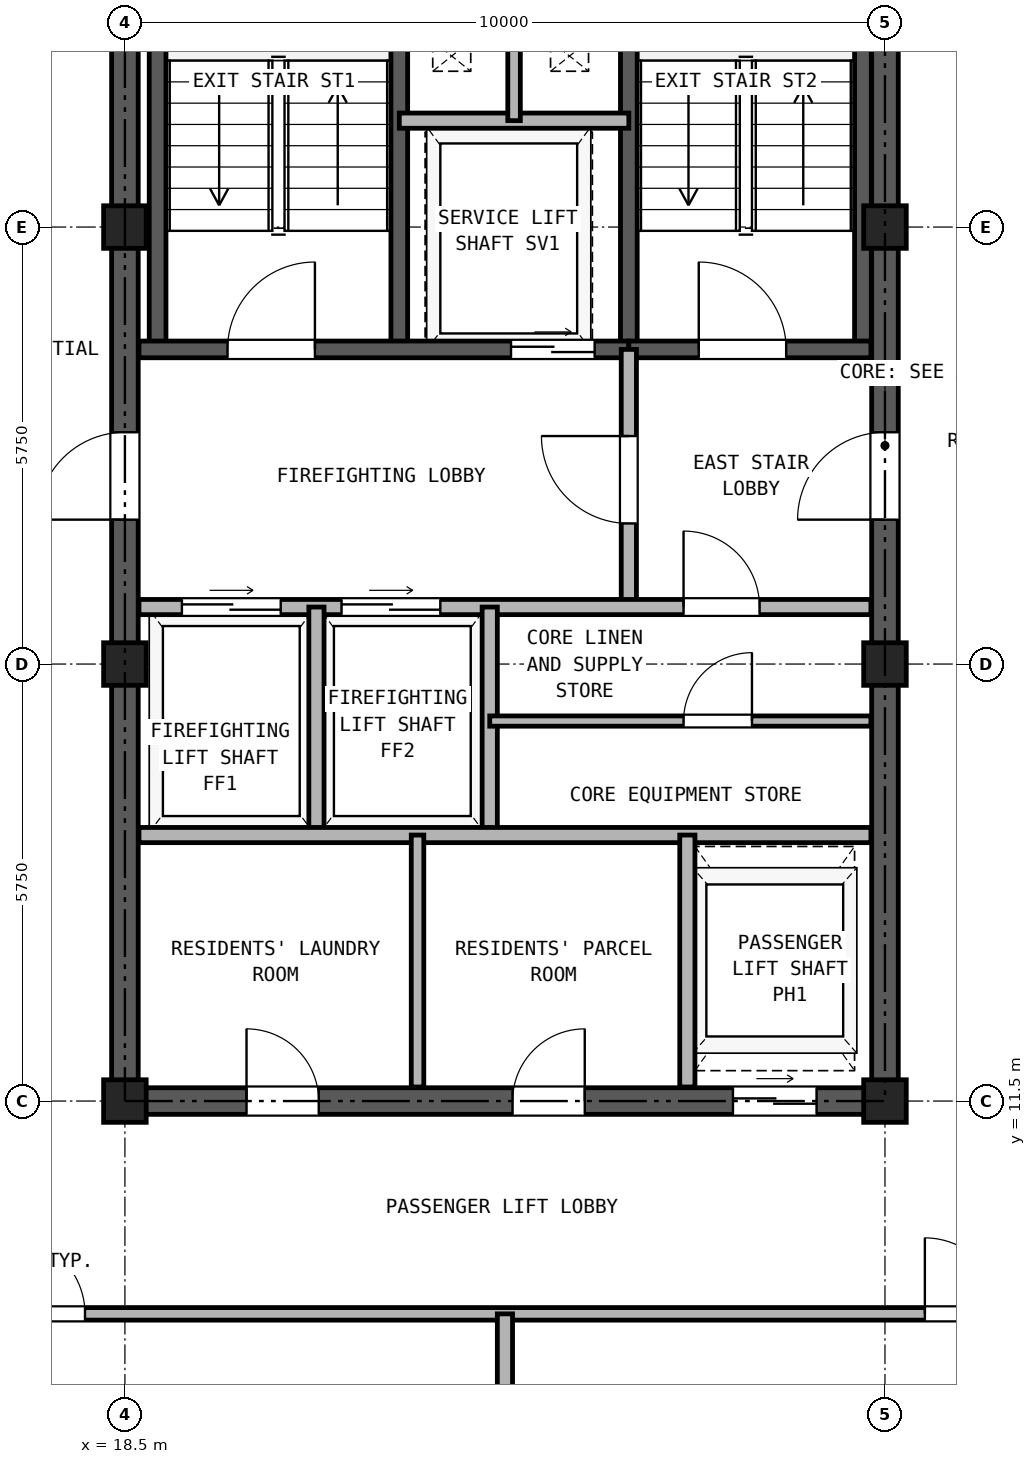
"""IFC4 building model, lengths in metres.
Left out: names, types, materials, properties, quantities, classifications, styles, units other than length and angle.
Written with IfcOpenShell. Run it as: python <this file> out.ifc"""

import sys

from ifc_helpers import new_model, si_unit, direction, frame, frame_2d, origin, origin_2d, place, context, subcontext, project, spatial, rectangle, hollow_rectangle, extrude, source, transform, mapped, element, fill, save


model = new_model("IFC4")
c1 = context("Model", 3, precision=1e-05, world=origin(), true_north=direction((0.0, 1.0)))
c2 = subcontext(c1, "Body", "Model", "MODEL_VIEW")
j1 = project(units=[si_unit("LENGTHUNIT", "METRE"), si_unit("PLANEANGLEUNIT", "RADIAN")], contexts=[c1])
p1 = place(None, origin())
s1 = spatial("IfcSite", under=j1, at=p1, CompositionType="ELEMENT")
p2 = place(p1, origin())
s2 = spatial("IfcBuilding", under=s1, at=p2, CompositionType="ELEMENT")
p3 = place(p2, frame((0.0, 0.0, 242.5)))
s3 = spatial("IfcBuildingStorey", under=s2, at=p3, CompositionType="ELEMENT", Elevation=242.5)
m1 = source(origin(), c2, "Body", "SweptSolid", [
    extrude(hollow_rectangle(XDim=0.56, YDim=0.56, WallThickness=0.03, at=origin_2d()), origin(), (0.0, 0.0, 1.0), 2.98),
])
for number, where, z_axis, x_axis in (
    (1, (18.5, 11.5, 0.0), (0.0, 0.0, 1.0), (1.0, 0.0, 0.0)),
    (2, (18.5, 17.25, 0.0), (0.0, 0.0, 1.0), (1.0, 0.0, 0.0)),
    (3, (18.5, 23.0, 0.0), (0.0, 0.0, 1.0), (1.0, 0.0, 0.0)),
    (4, (28.5, 11.5, 0.0), (0.0, 0.0, 1.0), (1.0, 0.0, 0.0)),
    (5, (28.5, 17.25, 0.0), (0.0, 0.0, 1.0), (1.0, 0.0, 0.0)),
    (6, (28.5, 23.0, 0.0), (0.0, 0.0, 1.0), (1.0, 0.0, 0.0)),
):
    element("IfcColumn", number, at=place(p3, frame(where, z_axis=z_axis, x_axis=x_axis)), inside=s3, PredefinedType="COLUMN", context=c2, shape_type="MappedRepresentation", body=[
        mapped(m1, transform((0.0, 0.0, 0.0), x_axis=(1.0, 0.0, 0.0), y_axis=(0.0, 1.0, 0.0), z_axis=(0.0, 0.0, 1.0), scale=1.0)),
    ])
p4 = place(p3, frame((18.325, 11.5, 0.0), z_axis=(0.0, 0.0, 1.0), x_axis=(1.0, 0.0, 0.0)))
e7 = element("IfcWall", 7, at=p4, inside=s3, PredefinedType="SHEAR", context=c2, shape_type="SweptSolid", body=[
    extrude(rectangle(XDim=10.35, YDim=0.35, at=frame_2d((5.175, 0.0))), origin(), (0.0, 0.0, 1.0), 2.98),
])
p5 = place(p4, frame((1.775, 0.0, 0.0)))
e8 = element("IfcOpeningElement", 8, at=p5, cuts=e7, PredefinedType="OPENING", context=c2, shape_type="SweptSolid", body=[
    extrude(rectangle(XDim=0.95, YDim=2.15, at=frame_2d((0.475, 1.075))), frame((0.0, 0.185, 0.0), z_axis=(0.0, -1.0, 0.0), x_axis=(1.0, 0.0, 0.0)), (0.0, 0.0, 1.0), 0.37),
])
p6 = place(p4, frame((5.275, 0.0, 0.0)))
e9 = element("IfcOpeningElement", 9, at=p6, cuts=e7, PredefinedType="OPENING", context=c2, shape_type="SweptSolid", body=[
    extrude(rectangle(XDim=0.95, YDim=2.15, at=frame_2d((0.475, 1.075))), frame((0.0, 0.185, 0.0), z_axis=(0.0, -1.0, 0.0), x_axis=(1.0, 0.0, 0.0)), (0.0, 0.0, 1.0), 0.37),
])
p7 = place(p4, frame((8.175, 0.0, 0.0)))
e10 = element("IfcOpeningElement", 10, at=p7, cuts=e7, PredefinedType="OPENING", context=c2, shape_type="SweptSolid", body=[
    extrude(rectangle(XDim=1.1, YDim=2.25, at=frame_2d((0.55, 1.125))), frame((0.0, 0.185, 0.0), z_axis=(0.0, -1.0, 0.0), x_axis=(1.0, 0.0, 0.0)), (0.0, 0.0, 1.0), 0.37),
])
p8 = place(p3, frame((18.5, 11.675, 0.0), z_axis=(0.0, 0.0, 1.0), x_axis=(0.0, 1.0, 0.0)))
e11 = element("IfcWall", 11, at=p8, inside=s3, PredefinedType="SHEAR", context=c2, shape_type="SweptSolid", body=[
    extrude(rectangle(XDim=16.9, YDim=0.35, at=frame_2d((8.45, 0.0))), origin(), (0.0, 0.0, 1.0), 2.98),
])
p9 = place(p8, frame((7.475, 0.0, 0.0)))
e12 = element("IfcOpeningElement", 12, at=p9, cuts=e11, PredefinedType="OPENING", context=c2, shape_type="SweptSolid", body=[
    extrude(rectangle(XDim=1.15, YDim=2.2, at=frame_2d((0.575, 1.1))), frame((0.0, 0.185, 0.0), z_axis=(0.0, -1.0, 0.0), x_axis=(1.0, 0.0, 0.0)), (0.0, 0.0, 1.0), 0.37),
])
p10 = place(p3, frame((28.5, 11.675, 0.0), z_axis=(0.0, 0.0, 1.0), x_axis=(0.0, 1.0, 0.0)))
e13 = element("IfcWall", 13, at=p10, inside=s3, PredefinedType="SHEAR", context=c2, shape_type="SweptSolid", body=[
    extrude(rectangle(XDim=16.9, YDim=0.35, at=frame_2d((8.45, 0.0))), origin(), (0.0, 0.0, 1.0), 2.98),
])
p11 = place(p10, frame((7.475, 0.0, 0.0)))
e14 = element("IfcOpeningElement", 14, at=p11, cuts=e13, PredefinedType="OPENING", context=c2, shape_type="SweptSolid", body=[
    extrude(rectangle(XDim=1.15, YDim=2.2, at=frame_2d((0.575, 1.1))), frame((0.0, 0.185, 0.0), z_axis=(0.0, -1.0, 0.0), x_axis=(1.0, 0.0, 0.0)), (0.0, 0.0, 1.0), 0.37),
])
for number, where, z_axis, x_axis in (
    (15, (18.93, 21.39, 0.0), (0.0, 0.0, 1.0), (0.0, 1.0, 0.0)),
    (16, (22.11, 21.39, 0.0), (0.0, 0.0, 1.0), (0.0, 1.0, 0.0)),
    (17, (25.13, 21.39, 0.0), (0.0, 0.0, 1.0), (0.0, 1.0, 0.0)),
):
    element("IfcWall", number, at=place(p3, frame(where, z_axis=z_axis, x_axis=x_axis)), inside=s3, PredefinedType="SOLIDWALL", context=c2, shape_type="SweptSolid", body=[
        extrude(rectangle(XDim=7.11, YDim=0.22, at=frame_2d((3.555, 0.0))), origin(), (0.0, 0.0, 1.0), 2.98),
    ])
p12 = place(p3, frame((28.21, 21.39, 0.0), z_axis=(0.0, 0.0, 1.0), x_axis=(0.0, 1.0, 0.0)))
e18 = element("IfcWall", 18, at=p12, inside=s3, PredefinedType="SOLIDWALL", context=c2, shape_type="SweptSolid", body=[
    extrude(rectangle(XDim=6.945, YDim=0.22, at=frame_2d((3.473, 0.0))), origin(), (0.0, 0.0, 1.0), 2.98),
])
p13 = place(p3, frame((18.685, 21.39, 0.0), z_axis=(0.0, 0.0, 1.0), x_axis=(1.0, 0.0, 0.0)))
e19 = element("IfcWall", 19, at=p13, inside=s3, PredefinedType="SOLIDWALL", context=c2, shape_type="SweptSolid", body=[
    extrude(rectangle(XDim=6.445, YDim=0.22, at=frame_2d((3.222, 0.0))), origin(), (0.0, 0.0, 1.0), 2.98),
])
p14 = place(p13, frame((1.165, 0.0, 0.0)))
e20 = element("IfcOpeningElement", 20, at=p14, cuts=e19, PredefinedType="OPENING", context=c2, shape_type="SweptSolid", body=[
    extrude(rectangle(XDim=1.15, YDim=2.2, at=frame_2d((0.575, 1.1))), frame((0.0, 0.12, 0.0), z_axis=(0.0, -1.0, 0.0), x_axis=(1.0, 0.0, 0.0)), (0.0, 0.0, 1.0), 0.24),
])
p15 = place(p13, frame((4.895, 0.0, 0.0)))
e21 = element("IfcOpeningElement", 21, at=p15, cuts=e19, PredefinedType="OPENING", context=c2, shape_type="SweptSolid", body=[
    extrude(rectangle(XDim=1.1, YDim=2.25, at=frame_2d((0.55, 1.125))), frame((0.0, 0.12, 0.0), z_axis=(0.0, -1.0, 0.0), x_axis=(1.0, 0.0, 0.0)), (0.0, 0.0, 1.0), 0.24),
])
p16 = place(p3, frame((25.13, 21.39, 0.0), z_axis=(0.0, 0.0, 1.0), x_axis=(1.0, 0.0, 0.0)))
e22 = element("IfcWall", 22, at=p16, inside=s3, PredefinedType="SOLIDWALL", context=c2, shape_type="SweptSolid", body=[
    extrude(rectangle(XDim=3.185, YDim=0.22, at=frame_2d((1.593, 0.0))), origin(), (0.0, 0.0, 1.0), 2.98),
])
p17 = place(p16, frame((0.92, 0.0, 0.0)))
e23 = element("IfcOpeningElement", 23, at=p17, cuts=e22, PredefinedType="OPENING", context=c2, shape_type="SweptSolid", body=[
    extrude(rectangle(XDim=1.15, YDim=2.2, at=frame_2d((0.575, 1.1))), frame((0.0, 0.12, 0.0), z_axis=(0.0, -1.0, 0.0), x_axis=(1.0, 0.0, 0.0)), (0.0, 0.0, 1.0), 0.24),
])
p18 = place(p3, frame((22.11, 24.4, 0.0), z_axis=(0.0, 0.0, 1.0), x_axis=(1.0, 0.0, 0.0)))
e24 = element("IfcWall", 24, at=p18, inside=s3, PredefinedType="PARTITIONING", context=c2, shape_type="SweptSolid", body=[
    extrude(rectangle(XDim=3.02, YDim=0.2, at=frame_2d((1.51, 0.0))), origin(), (0.0, 0.0, 1.0), 2.98),
])
p19 = place(p3, frame((23.62, 24.4, 0.0), z_axis=(0.0, 0.0, 1.0), x_axis=(0.0, 1.0, 0.0)))
e25 = element("IfcWall", 25, at=p19, inside=s3, PredefinedType="PARTITIONING", context=c2, shape_type="SweptSolid", body=[
    extrude(rectangle(XDim=4.165, YDim=0.165, at=frame_2d((2.083, 0.0))), origin(), (0.0, 0.0, 1.0), 2.98),
])
p20 = place(p3, frame((25.13, 18.0, 0.0), z_axis=(0.0, 0.0, 1.0), x_axis=(0.0, 1.0, 0.0)))
e26 = element("IfcWall", 26, at=p20, inside=s3, PredefinedType="PARTITIONING", context=c2, shape_type="SweptSolid", body=[
    extrude(rectangle(XDim=3.39, YDim=0.2, at=frame_2d((1.695, 0.0))), origin(), (0.0, 0.0, 1.0), 2.98),
])
p21 = place(p20, frame((1.1, 0.0, 0.0)))
e27 = element("IfcOpeningElement", 27, at=p21, cuts=e26, PredefinedType="OPENING", context=c2, shape_type="SweptSolid", body=[
    extrude(rectangle(XDim=1.15, YDim=2.2, at=frame_2d((0.575, 1.1))), frame((0.0, 0.11, 0.0), z_axis=(0.0, -1.0, 0.0), x_axis=(1.0, 0.0, 0.0)), (0.0, 0.0, 1.0), 0.22),
])
p22 = place(p3, frame((18.685, 18.0, 0.0), z_axis=(0.0, 0.0, 1.0), x_axis=(1.0, 0.0, 0.0)))
e28 = element("IfcWall", 28, at=p22, inside=s3, PredefinedType="PARTITIONING", context=c2, shape_type="SweptSolid", body=[
    extrude(rectangle(XDim=9.63, YDim=0.2, at=frame_2d((4.815, 0.0))), origin(), (0.0, 0.0, 1.0), 2.98),
])
p23 = place(p22, frame((0.565, 0.0, 0.0)))
e29 = element("IfcOpeningElement", 29, at=p23, cuts=e28, PredefinedType="OPENING", context=c2, shape_type="SweptSolid", body=[
    extrude(rectangle(XDim=1.3, YDim=2.3, at=frame_2d((0.65, 1.15))), frame((0.0, 0.11, 0.0), z_axis=(0.0, -1.0, 0.0), x_axis=(1.0, 0.0, 0.0)), (0.0, 0.0, 1.0), 0.22),
])
p24 = place(p22, frame((2.665, 0.0, 0.0)))
e30 = element("IfcOpeningElement", 30, at=p24, cuts=e28, PredefinedType="OPENING", context=c2, shape_type="SweptSolid", body=[
    extrude(rectangle(XDim=1.3, YDim=2.3, at=frame_2d((0.65, 1.15))), frame((0.0, 0.11, 0.0), z_axis=(0.0, -1.0, 0.0), x_axis=(1.0, 0.0, 0.0)), (0.0, 0.0, 1.0), 0.22),
])
p25 = place(p22, frame((7.165, 0.0, 0.0)))
e31 = element("IfcOpeningElement", 31, at=p25, cuts=e28, PredefinedType="OPENING", context=c2, shape_type="SweptSolid", body=[
    extrude(rectangle(XDim=1.0, YDim=2.15, at=frame_2d((0.5, 1.075))), frame((0.0, 0.11, 0.0), z_axis=(0.0, -1.0, 0.0), x_axis=(1.0, 0.0, 0.0)), (0.0, 0.0, 1.0), 0.22),
])
for number, where, z_axis, x_axis in (
    (32, (21.02, 15.0, 0.0), (0.0, 0.0, 1.0), (0.0, 1.0, 0.0)),
    (33, (23.3, 15.0, 0.0), (0.0, 0.0, 1.0), (0.0, 1.0, 0.0)),
):
    element("IfcWall", number, at=place(p3, frame(where, z_axis=z_axis, x_axis=x_axis)), inside=s3, PredefinedType="PARTITIONING", context=c2, shape_type="SweptSolid", body=[
        extrude(rectangle(XDim=3.0, YDim=0.2, at=frame_2d((1.5, 0.0))), origin(), (0.0, 0.0, 1.0), 2.98),
    ])
p26 = place(p3, frame((18.685, 15.0, 0.0), z_axis=(0.0, 0.0, 1.0), x_axis=(1.0, 0.0, 0.0)))
e34 = element("IfcWall", 34, at=p26, inside=s3, PredefinedType="PARTITIONING", context=c2, shape_type="SweptSolid", body=[
    extrude(rectangle(XDim=9.63, YDim=0.2, at=frame_2d((4.815, 0.0))), origin(), (0.0, 0.0, 1.0), 2.98),
])
p27 = place(p3, frame((23.3, 16.5, 0.0), z_axis=(0.0, 0.0, 1.0), x_axis=(1.0, 0.0, 0.0)))
e35 = element("IfcWall", 35, at=p27, inside=s3, PredefinedType="PARTITIONING", context=c2, shape_type="SweptSolid", body=[
    extrude(rectangle(XDim=5.015, YDim=0.135, at=frame_2d((2.507, 0.0))), origin(), (0.0, 0.0, 1.0), 2.98),
])
p28 = place(p27, frame((2.55, 0.0, 0.0)))
e36 = element("IfcOpeningElement", 36, at=p28, cuts=e35, PredefinedType="OPENING", context=c2, shape_type="SweptSolid", body=[
    extrude(rectangle(XDim=0.9, YDim=2.05, at=frame_2d((0.45, 1.025))), frame((0.0, 0.077, 0.0), z_axis=(0.0, -1.0, 0.0), x_axis=(1.0, 0.0, 0.0)), (0.0, 0.0, 1.0), 0.155),
])
p29 = place(p3, frame((22.35, 11.685, 0.0), z_axis=(0.0, 0.0, 1.0), x_axis=(0.0, 1.0, 0.0)))
e37 = element("IfcWall", 37, at=p29, inside=s3, PredefinedType="PARTITIONING", context=c2, shape_type="SweptSolid", body=[
    extrude(rectangle(XDim=3.315, YDim=0.165, at=frame_2d((1.657, 0.0))), origin(), (0.0, 0.0, 1.0), 2.98),
])
p30 = place(p3, frame((25.9, 11.685, 0.0), z_axis=(0.0, 0.0, 1.0), x_axis=(0.0, 1.0, 0.0)))
e38 = element("IfcWall", 38, at=p30, inside=s3, PredefinedType="PARTITIONING", context=c2, shape_type="SweptSolid", body=[
    extrude(rectangle(XDim=3.315, YDim=0.2, at=frame_2d((1.657, 0.0))), origin(), (0.0, 0.0, 1.0), 2.98),
])
p31 = place(p3, frame((5.36, 8.7, 0.0), z_axis=(0.0, 0.0, 1.0), x_axis=(1.0, 0.0, 0.0)))
e39 = element("IfcWall", 39, at=p31, inside=s3, PredefinedType="PARTITIONING", context=c2, shape_type="SweptSolid", body=[
    extrude(rectangle(XDim=36.28, YDim=0.165, at=frame_2d((18.14, 0.0))), origin(), (0.0, 0.0, 1.0), 2.655),
])
p32 = place(p31, frame((11.615, 0.0, 0.0)))
e40 = element("IfcOpeningElement", 40, at=p32, cuts=e39, PredefinedType="OPENING", context=c2, shape_type="SweptSolid", body=[
    extrude(rectangle(XDim=1.0, YDim=2.15, at=frame_2d((0.5, 1.075))), frame((0.0, 0.093, 0.0), z_axis=(0.0, -1.0, 0.0), x_axis=(1.0, 0.0, 0.0)), (0.0, 0.0, 1.0), 0.185),
])
p33 = place(p31, frame((23.665, 0.0, 0.0)))
e41 = element("IfcOpeningElement", 41, at=p33, cuts=e39, PredefinedType="OPENING", context=c2, shape_type="SweptSolid", body=[
    extrude(rectangle(XDim=1.0, YDim=2.15, at=frame_2d((0.5, 1.075))), frame((0.0, 0.093, 0.0), z_axis=(0.0, -1.0, 0.0), x_axis=(1.0, 0.0, 0.0)), (0.0, 0.0, 1.0), 0.185),
])
p34 = place(p3, frame((23.5, 0.16, 0.0), z_axis=(0.0, 0.0, 1.0), x_axis=(0.0, 1.0, 0.0)))
e42 = element("IfcWall", 42, at=p34, inside=s3, PredefinedType="PARTITIONING", context=c2, shape_type="SweptSolid", body=[
    extrude(rectangle(XDim=8.54, YDim=0.2, at=frame_2d((4.27, 0.0))), origin(), (0.0, 0.0, 1.0), 2.98),
])
p35 = place(p14, frame((1.15, 0.0, 0.0), z_axis=(0.0, 0.0, 1.0), x_axis=(-1.0, 0.0, 0.0)))
e43 = element("IfcDoor", 43, at=p35, inside=s3, OperationType="SINGLE_SWING_RIGHT", PredefinedType="DOOR", context=c2, shape_type="SweptSolid", body=[
    extrude(rectangle(XDim=1.15, YDim=2.2, at=frame_2d((0.575, 1.1))), frame((0.0, 0.025, 0.0), z_axis=(0.0, -1.0, 0.0), x_axis=(1.0, 0.0, 0.0)), (0.0, 0.0, 1.0), 0.05),
])
fill(e20, e43)
p36 = place(p17, frame((1.15, 0.0, 0.0), z_axis=(0.0, 0.0, 1.0), x_axis=(-1.0, 0.0, 0.0)))
e44 = element("IfcDoor", 44, at=p36, inside=s3, OperationType="SINGLE_SWING_LEFT", PredefinedType="DOOR", context=c2, shape_type="SweptSolid", body=[
    extrude(rectangle(XDim=1.15, YDim=2.2, at=frame_2d((0.575, 1.1))), frame((0.0, 0.025, 0.0), z_axis=(0.0, -1.0, 0.0), x_axis=(1.0, 0.0, 0.0)), (0.0, 0.0, 1.0), 0.05),
])
fill(e23, e44)
p37 = place(p15, frame((1.1, 0.0, 0.0), z_axis=(0.0, 0.0, 1.0), x_axis=(-1.0, 0.0, 0.0)))
e45 = element("IfcDoor", 45, at=p37, inside=s3, OperationType="DOUBLE_DOOR_SLIDING", PredefinedType="DOOR", context=c2, shape_type="SweptSolid", body=[
    extrude(rectangle(XDim=1.1, YDim=2.25, at=frame_2d((0.55, 1.125))), frame((0.0, 0.025, 0.0), z_axis=(0.0, -1.0, 0.0), x_axis=(1.0, 0.0, 0.0)), (0.0, 0.0, 1.0), 0.05),
])
fill(e21, e45)
p38 = place(p21, origin())
e46 = element("IfcDoor", 46, at=p38, inside=s3, OperationType="SINGLE_SWING_RIGHT", PredefinedType="DOOR", context=c2, shape_type="SweptSolid", body=[
    extrude(rectangle(XDim=1.15, YDim=2.2, at=frame_2d((0.575, 1.1))), frame((0.0, 0.025, 0.0), z_axis=(0.0, -1.0, 0.0), x_axis=(1.0, 0.0, 0.0)), (0.0, 0.0, 1.0), 0.05),
])
fill(e27, e46)
p39 = place(p23, origin())
e47 = element("IfcDoor", 47, at=p39, inside=s3, OperationType="DOUBLE_DOOR_SLIDING", PredefinedType="DOOR", context=c2, shape_type="SweptSolid", body=[
    extrude(rectangle(XDim=1.3, YDim=2.3, at=frame_2d((0.65, 1.15))), frame((0.0, 0.025, 0.0), z_axis=(0.0, -1.0, 0.0), x_axis=(1.0, 0.0, 0.0)), (0.0, 0.0, 1.0), 0.05),
])
fill(e29, e47)
p40 = place(p24, origin())
e48 = element("IfcDoor", 48, at=p40, inside=s3, OperationType="DOUBLE_DOOR_SLIDING", PredefinedType="DOOR", context=c2, shape_type="SweptSolid", body=[
    extrude(rectangle(XDim=1.3, YDim=2.3, at=frame_2d((0.65, 1.15))), frame((0.0, 0.025, 0.0), z_axis=(0.0, -1.0, 0.0), x_axis=(1.0, 0.0, 0.0)), (0.0, 0.0, 1.0), 0.05),
])
fill(e30, e48)
p41 = place(p25, frame((1.0, 0.0, 0.0), z_axis=(0.0, 0.0, 1.0), x_axis=(-1.0, 0.0, 0.0)))
e49 = element("IfcDoor", 49, at=p41, inside=s3, OperationType="SINGLE_SWING_LEFT", PredefinedType="DOOR", context=c2, shape_type="SweptSolid", body=[
    extrude(rectangle(XDim=1.0, YDim=2.15, at=frame_2d((0.5, 1.075))), frame((0.0, 0.025, 0.0), z_axis=(0.0, -1.0, 0.0), x_axis=(1.0, 0.0, 0.0)), (0.0, 0.0, 1.0), 0.05),
])
fill(e31, e49)
p42 = place(p28, frame((0.9, 0.0, 0.0), z_axis=(0.0, 0.0, 1.0), x_axis=(-1.0, 0.0, 0.0)))
e50 = element("IfcDoor", 50, at=p42, inside=s3, OperationType="SINGLE_SWING_RIGHT", PredefinedType="DOOR", context=c2, shape_type="SweptSolid", body=[
    extrude(rectangle(XDim=0.9, YDim=2.05, at=frame_2d((0.45, 1.025))), frame((0.0, 0.025, 0.0), z_axis=(0.0, -1.0, 0.0), x_axis=(1.0, 0.0, 0.0)), (0.0, 0.0, 1.0), 0.05),
])
fill(e36, e50)
p43 = place(p9, frame((1.15, 0.0, 0.0), z_axis=(0.0, 0.0, 1.0), x_axis=(-1.0, 0.0, 0.0)))
e51 = element("IfcDoor", 51, at=p43, inside=s3, OperationType="SINGLE_SWING_LEFT", PredefinedType="DOOR", context=c2, shape_type="SweptSolid", body=[
    extrude(rectangle(XDim=1.15, YDim=2.2, at=frame_2d((0.575, 1.1))), frame((0.0, 0.025, 0.0), z_axis=(0.0, -1.0, 0.0), x_axis=(1.0, 0.0, 0.0)), (0.0, 0.0, 1.0), 0.05),
])
fill(e12, e51)
p44 = place(p11, origin())
e52 = element("IfcDoor", 52, at=p44, inside=s3, OperationType="SINGLE_SWING_LEFT", PredefinedType="DOOR", context=c2, shape_type="SweptSolid", body=[
    extrude(rectangle(XDim=1.15, YDim=2.2, at=frame_2d((0.575, 1.1))), frame((0.0, 0.025, 0.0), z_axis=(0.0, -1.0, 0.0), x_axis=(1.0, 0.0, 0.0)), (0.0, 0.0, 1.0), 0.05),
])
fill(e14, e52)
p45 = place(p5, frame((0.95, 0.0, 0.0), z_axis=(0.0, 0.0, 1.0), x_axis=(-1.0, 0.0, 0.0)))
e53 = element("IfcDoor", 53, at=p45, inside=s3, OperationType="SINGLE_SWING_LEFT", PredefinedType="DOOR", context=c2, shape_type="SweptSolid", body=[
    extrude(rectangle(XDim=0.95, YDim=2.15, at=frame_2d((0.475, 1.075))), frame((0.0, 0.025, 0.0), z_axis=(0.0, -1.0, 0.0), x_axis=(1.0, 0.0, 0.0)), (0.0, 0.0, 1.0), 0.05),
])
fill(e8, e53)
p46 = place(p6, frame((0.95, 0.0, 0.0), z_axis=(0.0, 0.0, 1.0), x_axis=(-1.0, 0.0, 0.0)))
e54 = element("IfcDoor", 54, at=p46, inside=s3, OperationType="SINGLE_SWING_RIGHT", PredefinedType="DOOR", context=c2, shape_type="SweptSolid", body=[
    extrude(rectangle(XDim=0.95, YDim=2.15, at=frame_2d((0.475, 1.075))), frame((0.0, 0.025, 0.0), z_axis=(0.0, -1.0, 0.0), x_axis=(1.0, 0.0, 0.0)), (0.0, 0.0, 1.0), 0.05),
])
fill(e9, e54)
p47 = place(p7, frame((1.1, 0.0, 0.0), z_axis=(0.0, 0.0, 1.0), x_axis=(-1.0, 0.0, 0.0)))
e55 = element("IfcDoor", 55, at=p47, inside=s3, OperationType="DOUBLE_DOOR_SLIDING", PredefinedType="DOOR", context=c2, shape_type="SweptSolid", body=[
    extrude(rectangle(XDim=1.1, YDim=2.25, at=frame_2d((0.55, 1.125))), frame((0.0, 0.025, 0.0), z_axis=(0.0, -1.0, 0.0), x_axis=(1.0, 0.0, 0.0)), (0.0, 0.0, 1.0), 0.05),
])
fill(e10, e55)
p48 = place(p32, frame((1.0, 0.0, 0.0), z_axis=(0.0, 0.0, 1.0), x_axis=(-1.0, 0.0, 0.0)))
e56 = element("IfcDoor", 56, at=p48, inside=s3, OperationType="SINGLE_SWING_LEFT", PredefinedType="DOOR", context=c2, shape_type="SweptSolid", body=[
    extrude(rectangle(XDim=1.0, YDim=2.15, at=frame_2d((0.5, 1.075))), frame((0.0, 0.025, 0.0), z_axis=(0.0, -1.0, 0.0), x_axis=(1.0, 0.0, 0.0)), (0.0, 0.0, 1.0), 0.05),
])
fill(e40, e56)
p49 = place(p33, frame((1.0, 0.0, 0.0), z_axis=(0.0, 0.0, 1.0), x_axis=(-1.0, 0.0, 0.0)))
e57 = element("IfcDoor", 57, at=p49, inside=s3, OperationType="SINGLE_SWING_LEFT", PredefinedType="DOOR", context=c2, shape_type="SweptSolid", body=[
    extrude(rectangle(XDim=1.0, YDim=2.15, at=frame_2d((0.5, 1.075))), frame((0.0, 0.025, 0.0), z_axis=(0.0, -1.0, 0.0), x_axis=(1.0, 0.0, 0.0)), (0.0, 0.0, 1.0), 0.05),
])
fill(e41, e57)
save(model, sys.argv[1])
